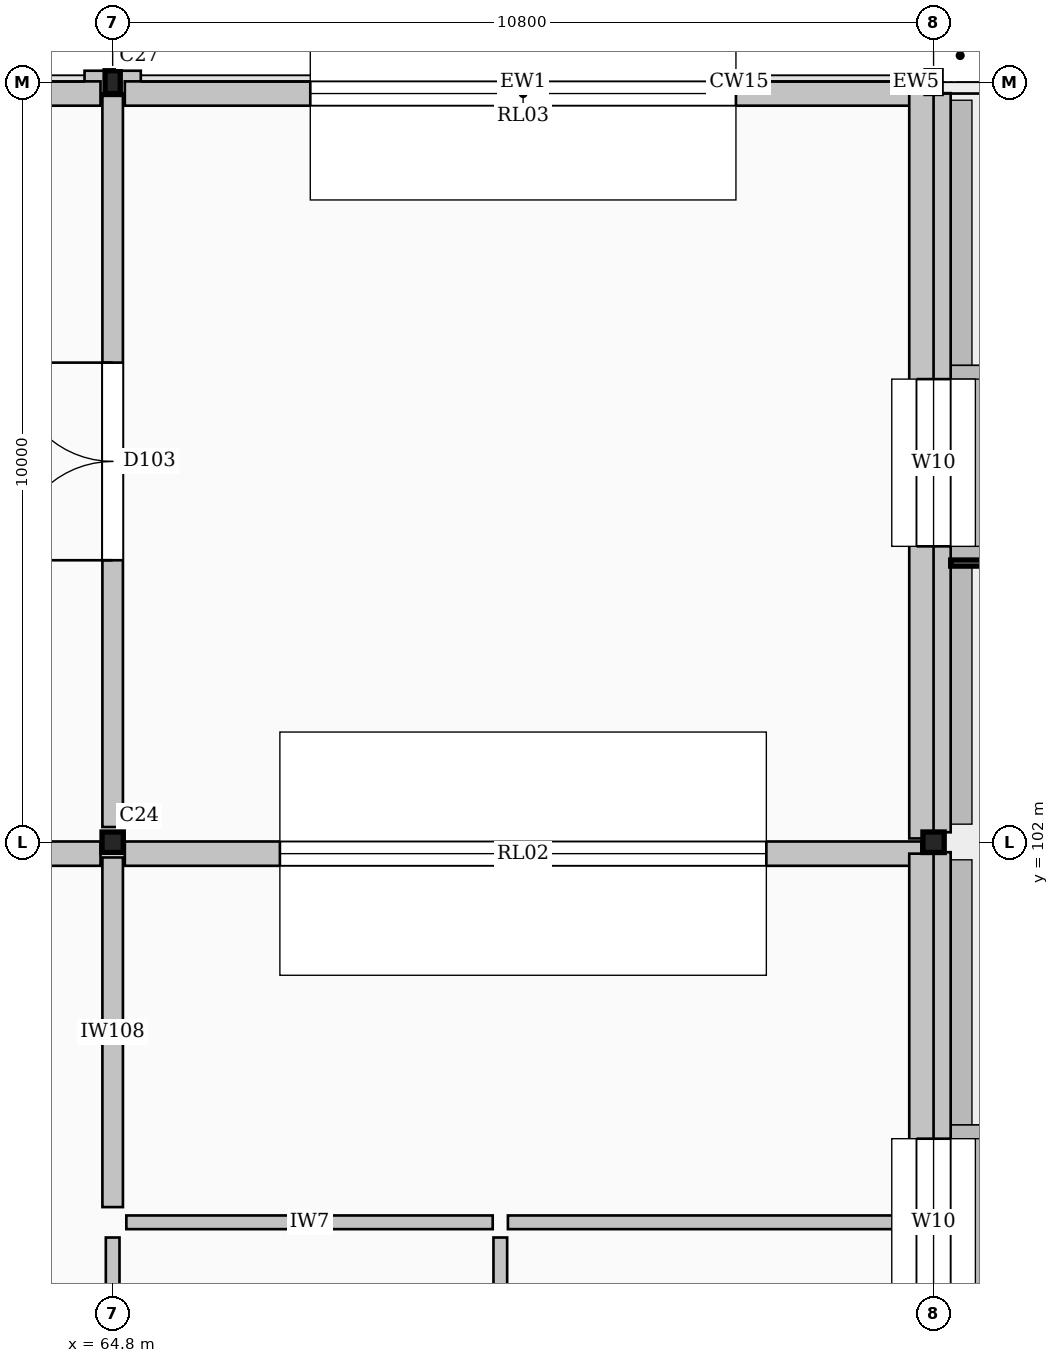
"""IFC4 building model, lengths in metres.
Left out: names, types, materials, properties, quantities, classifications, styles, units other than length and angle.
Written with IfcOpenShell. Run it as: python <this file> out.ifc"""

import sys

from ifc_helpers import new_model, si_unit, direction, frame, frame_2d, origin, origin_2d, place, context, subcontext, project, spatial, polyline, rectangle, hollow_rectangle, i_section, outline, extrude, element, fill, save


model = new_model("IFC4")
c1 = context("Model", 3, precision=1e-05, world=origin(), true_north=direction((0.0, 1.0)))
c2 = subcontext(c1, "Body", "Model", "MODEL_VIEW")
j1 = project(units=[si_unit("LENGTHUNIT", "METRE"), si_unit("PLANEANGLEUNIT", "RADIAN")], contexts=[c1])
p1 = place(None, origin())
s1 = spatial("IfcSite", under=j1, at=p1, CompositionType="ELEMENT")
p2 = place(p1, origin())
s2 = spatial("IfcBuilding", under=s1, at=p2, CompositionType="ELEMENT")
p3 = place(p2, frame((0.0, 0.0, 28.8)))
s3 = spatial("IfcBuildingStorey", under=s2, at=p3, CompositionType="ELEMENT", Elevation=28.8)
p4 = place(p3, frame((64.8, 102.0, 0.0), z_axis=(0.0, 0.0, 1.0), x_axis=(1.0, 0.0, 0.0)))
e1 = element("IfcColumn", 1, at=p4, inside=s3, PredefinedType="COLUMN", context=c2, shape_type="SweptSolid", body=[
    extrude(i_section(OverallWidth=0.28, OverallDepth=0.27, WebThickness=0.008, FlangeThickness=0.013, FilletRadius=0.024, at=origin_2d()), origin(), (0.0, 0.0, 1.0), 5.4),
])
p5 = place(p3, frame((64.8, 112.0, 0.0), z_axis=(0.0, 0.0, 1.0), x_axis=(1.0, 0.0, 0.0)))
e2 = element("IfcColumn", 2, at=p5, inside=s3, PredefinedType="COLUMN", context=c2, shape_type="SweptSolid", body=[
    extrude(hollow_rectangle(XDim=0.2, YDim=0.3, WallThickness=0.012, InnerFilletRadius=0.012, OuterFilletRadius=0.025, at=origin_2d()), origin(), (0.0, 0.0, 1.0), 5.4),
])
p6 = place(p3, frame((75.6, 102.0, 0.0), z_axis=(0.0, 0.0, 1.0), x_axis=(1.0, 0.0, 0.0)))
e3 = element("IfcColumn", 3, at=p6, inside=s3, PredefinedType="COLUMN", context=c2, shape_type="SweptSolid", body=[
    extrude(i_section(OverallWidth=0.28, OverallDepth=0.27, WebThickness=0.008, FlangeThickness=0.013, FilletRadius=0.024, at=origin_2d()), origin(), (0.0, 0.0, 1.0), 5.4),
])
p7 = place(p3, frame((75.6, 112.0, 0.0), z_axis=(0.0, 0.0, 1.0), x_axis=(1.0, 0.0, 0.0)))
e4 = element("IfcColumn", 4, at=p7, inside=s3, PredefinedType="COLUMN", context=c2, shape_type="SweptSolid", body=[
    extrude(hollow_rectangle(XDim=0.2, YDim=0.3, WallThickness=0.012, InnerFilletRadius=0.012, OuterFilletRadius=0.025, at=origin_2d()), origin(), (0.0, 0.0, 1.0), 5.4),
])
p8 = place(p3, frame((75.6, 92.131, 0.0), z_axis=(0.0, 0.0, 1.0), x_axis=(0.0, 1.0, 0.0)))
e5 = element("IfcWall", 5, at=p8, inside=s3, PredefinedType="STANDARD", context=c2, shape_type="SweptSolid", body=[
    extrude(rectangle(XDim=9.738, YDim=0.45, at=frame_2d((4.869, 0.0))), origin(), (0.0, 0.0, 1.0), 5.16),
])
p9 = place(p8, frame((3.769, 0.0, 1.0)))
e6 = element("IfcOpeningElement", 6, at=p9, cuts=e5, PredefinedType="OPENING", context=c2, shape_type="SweptSolid", body=[
    extrude(rectangle(XDim=2.2, YDim=3.0, at=frame_2d((1.1, 1.5))), frame((0.0, 0.235, 0.0), z_axis=(0.0, -1.0, 0.0), x_axis=(1.0, 0.0, 0.0)), (0.0, 0.0, 1.0), 0.47),
])
p10 = place(p3, frame((75.6, 102.131, 0.0), z_axis=(0.0, 0.0, 1.0), x_axis=(0.0, 1.0, 0.0)))
e7 = element("IfcWall", 7, at=p10, inside=s3, PredefinedType="STANDARD", context=c2, shape_type="SweptSolid", body=[
    extrude(rectangle(XDim=9.724, YDim=0.45, at=frame_2d((4.862, 0.0))), origin(), (0.0, 0.0, 1.0), 5.16),
])
p11 = place(p10, frame((3.762, 0.0, 1.0)))
e8 = element("IfcOpeningElement", 8, at=p11, cuts=e7, PredefinedType="OPENING", context=c2, shape_type="SweptSolid", body=[
    extrude(rectangle(XDim=2.2, YDim=3.0, at=frame_2d((1.1, 1.5))), frame((0.0, 0.235, 0.0), z_axis=(0.0, -1.0, 0.0), x_axis=(1.0, 0.0, 0.0)), (0.0, 0.0, 1.0), 0.47),
])
p12 = place(p3, frame((70.85, 112.0, 0.0), z_axis=(0.0, 0.0, 1.0), x_axis=(-1.0, 0.0, 0.0)))
e9 = element("IfcWall", 9, at=p12, inside=s3, PredefinedType="STANDARD", context=c2, shape_type="SweptSolid", body=[
    extrude(rectangle(XDim=1.3, YDim=0.48, at=frame_2d((0.65, 0.0))), origin(), (0.0, 0.0, 1.0), 5.044),
])
for number, where, z_axis, x_axis in (
    (10, (75.504, 112.0, 0.0), (0.0, 0.0, 1.0), (-1.0, 0.0, 0.0)),
    (11, (65.17, 112.0, 0.0), (0.0, 0.0, 1.0), (-1.0, 0.0, 0.0)),
):
    element("IfcWall", number, at=place(p3, frame(where, z_axis=z_axis, x_axis=x_axis)), inside=s3, PredefinedType="STANDARD", context=c2, shape_type="SweptSolid", body=[
        extrude(rectangle(XDim=0.274, YDim=0.3, at=frame_2d((0.137, 0.0))), origin(), (0.0, 0.0, 1.0), 5.16),
    ])
p13 = place(p3, frame((64.704, 112.0, 0.0), z_axis=(0.0, 0.0, 1.0), x_axis=(-1.0, 0.0, 0.0)))
e12 = element("IfcWall", 12, at=p13, inside=s3, PredefinedType="STANDARD", context=c2, shape_type="SweptSolid", body=[
    extrude(rectangle(XDim=0.274, YDim=0.3, at=frame_2d((0.137, 0.0))), origin(), (0.0, 0.0, 1.0), 5.16),
])
p14 = place(p3, frame((54.16, 101.85, 5.4), z_axis=(0.0, 0.0, 1.0), x_axis=(1.0, 0.0, 0.0)))
e13 = element("IfcWall", 13, at=p14, inside=s3, PredefinedType="STANDARD", context=c2, shape_type="SweptSolid", body=[
    extrude(rectangle(XDim=10.48, YDim=0.32, at=frame_2d((5.24, 0.0))), origin(), (0.0, 0.0, 1.0), 2.45),
])
p15 = place(p14, frame((2.04, 0.0, 0.45)))
e14 = element("IfcOpeningElement", 14, at=p15, cuts=e13, PredefinedType="OPENING", context=c2, shape_type="SweptSolid", body=[
    extrude(rectangle(XDim=6.4, YDim=1.5, at=frame_2d((3.2, 0.75))), frame((0.0, 0.17, 0.0), z_axis=(0.0, -1.0, 0.0), x_axis=(1.0, 0.0, 0.0)), (0.0, 0.0, 1.0), 0.34),
])
p16 = place(p3, frame((64.96, 101.85, 5.4), z_axis=(0.0, 0.0, 1.0), x_axis=(1.0, 0.0, 0.0)))
e15 = element("IfcWall", 15, at=p16, inside=s3, PredefinedType="STANDARD", context=c2, shape_type="SweptSolid", body=[
    extrude(rectangle(XDim=10.48, YDim=0.32, at=frame_2d((5.24, 0.0))), origin(), (0.0, 0.0, 1.0), 2.45),
])
p17 = place(p16, frame((2.04, 0.0, 0.45)))
e16 = element("IfcOpeningElement", 16, at=p17, cuts=e15, PredefinedType="OPENING", context=c2, shape_type="SweptSolid", body=[
    extrude(rectangle(XDim=6.4, YDim=1.5, at=frame_2d((3.2, 0.75))), frame((0.0, 0.17, 0.0), z_axis=(0.0, -1.0, 0.0), x_axis=(1.0, 0.0, 0.0)), (0.0, 0.0, 1.0), 0.34),
])
p18 = place(p3, frame((75.44, 92.05, 5.4), z_axis=(0.0, 0.0, 1.0), x_axis=(0.0, 1.0, 0.0)))
e17 = element("IfcWall", 17, at=p18, inside=s3, PredefinedType="STANDARD", context=c2, shape_type="SweptSolid", body=[
    extrude(outline(polyline([(0.0, 0.0), (9.8, 0.0), (9.8, 2.55), (0.0, 0.15), (0.0, 0.0)])), frame((0.0, 0.16, 0.0), z_axis=(0.0, -1.0, 0.0), x_axis=(1.0, 0.0, 0.0)), (0.0, 0.0, 1.0), 0.32),
])
p19 = place(p3, frame((54.16, 111.85, 5.4), z_axis=(0.0, 0.0, 1.0), x_axis=(1.0, 0.0, 0.0)))
e18 = element("IfcWall", 18, at=p19, inside=s3, PredefinedType="STANDARD", context=c2, shape_type="SweptSolid", body=[
    extrude(rectangle(XDim=10.48, YDim=0.32, at=frame_2d((5.24, 0.0))), origin(), (0.0, 0.0, 1.0), 2.45),
])
p20 = place(p19, frame((2.44, 0.0, 0.45)))
e19 = element("IfcOpeningElement", 19, at=p20, cuts=e18, PredefinedType="OPENING", context=c2, shape_type="SweptSolid", body=[
    extrude(rectangle(XDim=5.6, YDim=1.4, at=frame_2d((2.8, 0.7))), frame((0.0, 0.17, 0.0), z_axis=(0.0, -1.0, 0.0), x_axis=(1.0, 0.0, 0.0)), (0.0, 0.0, 1.0), 0.34),
])
p21 = place(p3, frame((64.96, 111.85, 5.4), z_axis=(0.0, 0.0, 1.0), x_axis=(1.0, 0.0, 0.0)))
e20 = element("IfcWall", 20, at=p21, inside=s3, PredefinedType="STANDARD", context=c2, shape_type="SweptSolid", body=[
    extrude(rectangle(XDim=10.48, YDim=0.32, at=frame_2d((5.24, 0.0))), origin(), (0.0, 0.0, 1.0), 2.45),
])
p22 = place(p21, frame((2.44, 0.0, 0.45)))
e21 = element("IfcOpeningElement", 21, at=p22, cuts=e20, PredefinedType="OPENING", context=c2, shape_type="SweptSolid", body=[
    extrude(rectangle(XDim=5.6, YDim=1.4, at=frame_2d((2.8, 0.7))), frame((0.0, 0.17, 0.0), z_axis=(0.0, -1.0, 0.0), x_axis=(1.0, 0.0, 0.0)), (0.0, 0.0, 1.0), 0.34),
])
p23 = place(p3, frame((75.44, 102.05, 5.4), z_axis=(0.0, 0.0, 1.0), x_axis=(0.0, 1.0, 0.0)))
e22 = element("IfcWall", 22, at=p23, inside=s3, PredefinedType="STANDARD", context=c2, shape_type="SweptSolid", body=[
    extrude(outline(polyline([(0.0, 0.0), (9.8, 0.0), (9.8, 2.55), (0.0, 0.15), (0.0, 0.0)])), frame((0.0, 0.16, 0.0), z_axis=(0.0, -1.0, 0.0), x_axis=(1.0, 0.0, 0.0)), (0.0, 0.0, 1.0), 0.32),
])
p24 = place(p3, frame((64.8, 97.2, 0.0), z_axis=(0.0, 0.0, 1.0), x_axis=(0.0, 1.0, 0.0)))
e23 = element("IfcWall", 23, at=p24, inside=s3, PredefinedType="PARTITIONING", context=c2, shape_type="SweptSolid", body=[
    extrude(rectangle(XDim=4.6, YDim=0.27, at=frame_2d((2.3, 0.0))), origin(), (0.0, 0.0, 1.0), 5.12),
])
p25 = place(p3, frame((64.8, 102.2, 0.0), z_axis=(0.0, 0.0, 1.0), x_axis=(0.0, 1.0, 0.0)))
e24 = element("IfcWall", 24, at=p25, inside=s3, PredefinedType="PARTITIONING", context=c2, shape_type="SweptSolid", body=[
    extrude(rectangle(XDim=9.62, YDim=0.27, at=frame_2d((4.81, 0.0))), origin(), (0.0, 0.0, 1.0), 5.12),
])
p26 = place(p25, frame((3.51, 0.0, 0.0)))
e25 = element("IfcOpeningElement", 25, at=p26, cuts=e24, PredefinedType="OPENING", context=c2, shape_type="SweptSolid", body=[
    extrude(rectangle(XDim=2.6, YDim=2.8, at=frame_2d((1.3, 1.4))), frame((0.0, 0.145, 0.0), z_axis=(0.0, -1.0, 0.0), x_axis=(1.0, 0.0, 0.0)), (0.0, 0.0, 1.0), 0.29),
])
p27 = place(p3, frame((64.98, 97.0, 0.0), z_axis=(0.0, 0.0, 1.0), x_axis=(1.0, 0.0, 0.0)))
e26 = element("IfcWall", 26, at=p27, inside=s3, PredefinedType="PLUMBINGWALL", context=c2, shape_type="SweptSolid", body=[
    extrude(rectangle(XDim=4.82, YDim=0.18, at=frame_2d((2.41, 0.0))), origin(), (0.0, 0.0, 1.0), 5.12),
])
p28 = place(p3, frame((70.0, 97.0, 0.0), z_axis=(0.0, 0.0, 1.0), x_axis=(1.0, 0.0, 0.0)))
e27 = element("IfcWall", 27, at=p28, inside=s3, PredefinedType="PLUMBINGWALL", context=c2, shape_type="SweptSolid", body=[
    extrude(rectangle(XDim=5.42, YDim=0.18, at=frame_2d((2.71, 0.0))), origin(), (0.0, 0.0, 1.0), 5.12),
])
for number, where, z_axis, x_axis in (
    (28, (64.8, 92.18, 0.0), (0.0, 0.0, 1.0), (0.0, 1.0, 0.0)),
    (29, (69.9, 92.18, 0.0), (0.0, 0.0, 1.0), (0.0, 1.0, 0.0)),
):
    element("IfcWall", number, at=place(p3, frame(where, z_axis=z_axis, x_axis=x_axis)), inside=s3, PredefinedType="PLUMBINGWALL", context=c2, shape_type="SweptSolid", body=[
        extrude(rectangle(XDim=4.62, YDim=0.18, at=frame_2d((2.31, 0.0))), origin(), (0.0, 0.0, 1.0), 5.12),
    ])
p29 = place(p9, origin())
e30 = element("IfcWindow", 30, at=p29, inside=s3, PartitioningType="SINGLE_PANEL", PredefinedType="WINDOW", context=c2, shape_type="SweptSolid", body=[
    extrude(rectangle(XDim=2.2, YDim=3.0, at=frame_2d((1.1, 1.5))), frame((0.0, 0.03, 0.0), z_axis=(0.0, -1.0, 0.0), x_axis=(1.0, 0.0, 0.0)), (0.0, 0.0, 1.0), 0.06),
])
fill(e6, e30)
p30 = place(p11, origin())
e31 = element("IfcWindow", 31, at=p30, inside=s3, PartitioningType="SINGLE_PANEL", PredefinedType="WINDOW", context=c2, shape_type="SweptSolid", body=[
    extrude(rectangle(XDim=2.2, YDim=3.0, at=frame_2d((1.1, 1.5))), frame((0.0, 0.03, 0.0), z_axis=(0.0, -1.0, 0.0), x_axis=(1.0, 0.0, 0.0)), (0.0, 0.0, 1.0), 0.06),
])
fill(e8, e31)
p31 = place(p17, origin())
e32 = element("IfcWindow", 32, at=p31, inside=s3, PartitioningType="SINGLE_PANEL", PredefinedType="SKYLIGHT", context=c2, shape_type="SweptSolid", body=[
    extrude(rectangle(XDim=6.4, YDim=1.5, at=frame_2d((3.2, 0.75))), frame((0.0, 0.03, 0.0), z_axis=(0.0, -1.0, 0.0), x_axis=(1.0, 0.0, 0.0)), (0.0, 0.0, 1.0), 0.06),
])
fill(e16, e32)
p32 = place(p22, origin())
e33 = element("IfcWindow", 33, at=p32, inside=s3, PartitioningType="SINGLE_PANEL", PredefinedType="SKYLIGHT", context=c2, shape_type="SweptSolid", body=[
    extrude(rectangle(XDim=5.6, YDim=1.4, at=frame_2d((2.8, 0.7))), frame((0.0, 0.03, 0.0), z_axis=(0.0, -1.0, 0.0), x_axis=(1.0, 0.0, 0.0)), (0.0, 0.0, 1.0), 0.06),
])
fill(e21, e33)
p33 = place(p26, origin())
e34 = element("IfcDoor", 34, at=p33, inside=s3, OperationType="DOUBLE_DOOR_SINGLE_SWING", PredefinedType="DOOR", context=c2, shape_type="SweptSolid", body=[
    extrude(rectangle(XDim=2.6, YDim=2.8, at=frame_2d((1.3, 1.4))), frame((0.0, 0.025, 0.0), z_axis=(0.0, -1.0, 0.0), x_axis=(1.0, 0.0, 0.0)), (0.0, 0.0, 1.0), 0.05),
])
fill(e25, e34)
save(model, sys.argv[1])
